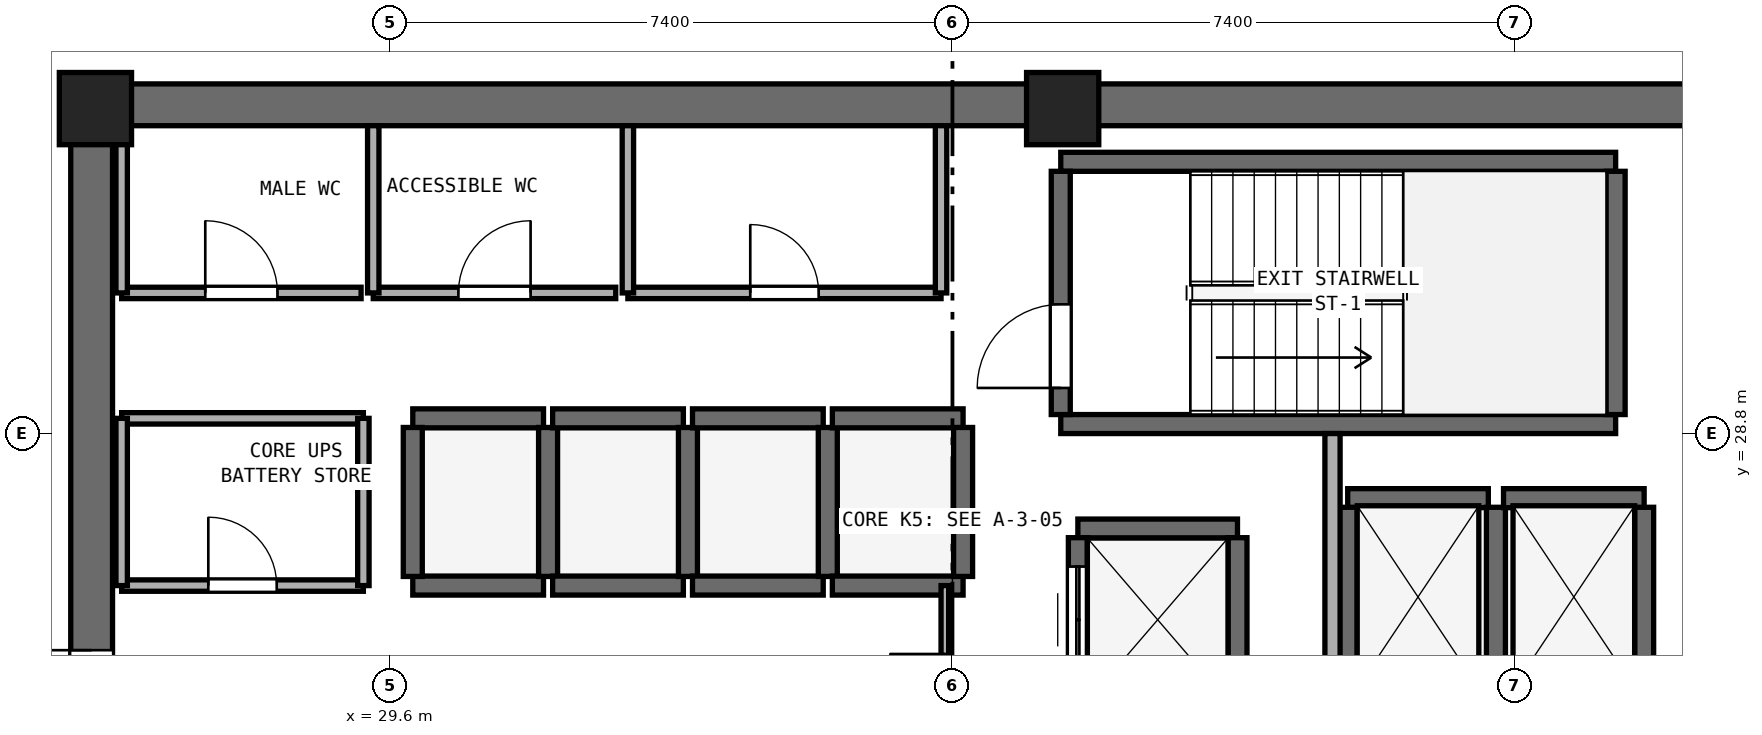
"""IFC4 building model, lengths in metres.
Left out: names, types, materials, properties, quantities, classifications, styles, units other than length and angle.
Written with IfcOpenShell. Run it as: python <this file> out.ifc"""

import sys

from ifc_helpers import new_model, si_unit, direction, frame, frame_2d, origin, origin_2d, place, context, subcontext, project, spatial, rectangle, extrude, element, fill, save


model = new_model("IFC4")
c1 = context("Model", 3, precision=1e-05, world=origin(), true_north=direction((0.0, 1.0)))
c2 = subcontext(c1, "Body", "Model", "MODEL_VIEW")
j1 = project(units=[si_unit("LENGTHUNIT", "METRE"), si_unit("PLANEANGLEUNIT", "RADIAN")], contexts=[c1])
p1 = place(None, origin())
s1 = spatial("IfcSite", under=j1, at=p1, CompositionType="ELEMENT")
p2 = place(p1, origin())
s2 = spatial("IfcBuilding", under=s1, at=p2, CompositionType="ELEMENT")
p3 = place(p2, frame((0.0, 0.0, 204.8)))
s3 = spatial("IfcBuildingStorey", under=s2, at=p3, CompositionType="ELEMENT", Elevation=204.8)
p4 = place(p3, frame((25.4, 33.125, 0.0), z_axis=(0.0, 0.0, 1.0), x_axis=(1.0, 0.0, 0.0)))
e1 = element("IfcWall", 1, at=p4, inside=s3, PredefinedType="SHEAR", context=c2, shape_type="SweptSolid", body=[
    extrude(rectangle(XDim=23.2, YDim=0.55, at=frame_2d((11.6, 0.0))), origin(), (0.0, 0.0, 1.0), 3.54),
])
p5 = place(p3, frame((25.675, 17.55, 0.0), z_axis=(0.0, 0.0, 1.0), x_axis=(0.0, 1.0, 0.0)))
e2 = element("IfcWall", 2, at=p5, inside=s3, PredefinedType="SHEAR", context=c2, shape_type="SweptSolid", body=[
    extrude(rectangle(XDim=15.3, YDim=0.55, at=frame_2d((7.65, 0.0))), origin(), (0.0, 0.0, 1.0), 3.54),
])
p6 = place(p5, frame((6.9, 0.0, 0.0)))
e3 = element("IfcOpeningElement", 3, at=p6, cuts=e2, PredefinedType="OPENING", context=c2, shape_type="SweptSolid", body=[
    extrude(rectangle(XDim=1.5, YDim=2.15, at=frame_2d((0.75, 1.075))), frame((0.0, 0.285, 0.0), z_axis=(0.0, -1.0, 0.0), x_axis=(1.0, 0.0, 0.0)), (0.0, 0.0, 1.0), 0.57),
])
for number, where, z_axis, x_axis in (
    (4, (38.45, 33.075, 0.0), (0.0, 0.0, 1.0), (1.0, 0.0, 0.0)),
    (5, (25.725, 33.075, 0.0), (0.0, 0.0, 1.0), (1.0, 0.0, 0.0)),
):
    element("IfcColumn", number, at=place(p3, frame(where, z_axis=z_axis, x_axis=x_axis)), inside=s3, PredefinedType="PILASTER", context=c2, shape_type="SweptSolid", body=[
        extrude(rectangle(XDim=0.95, YDim=0.95, at=origin_2d()), origin(), (0.0, 0.0, 1.0), 3.8),
    ])
for number, where, z_axis, x_axis in (
    (6, (38.425, 28.925, 0.0), (0.0, 0.0, 1.0), (1.0, 0.0, 0.0)),
    (7, (38.425, 32.375, 0.0), (0.0, 0.0, 1.0), (1.0, 0.0, 0.0)),
):
    element("IfcWall", number, at=place(p3, frame(where, z_axis=z_axis, x_axis=x_axis)), inside=s3, PredefinedType="SHEAR", context=c2, shape_type="SweptSolid", body=[
        extrude(rectangle(XDim=7.3, YDim=0.25, at=frame_2d((3.65, 0.0))), origin(), (0.0, 0.0, 1.0), 3.54),
    ])
p7 = place(p3, frame((38.425, 29.05, 0.0), z_axis=(0.0, 0.0, 1.0), x_axis=(0.0, 1.0, 0.0)))
e8 = element("IfcWall", 8, at=p7, inside=s3, PredefinedType="SHEAR", context=c2, shape_type="SweptSolid", body=[
    extrude(rectangle(XDim=3.2, YDim=0.25, at=frame_2d((1.6, 0.0))), origin(), (0.0, 0.0, 1.0), 3.54),
])
p8 = place(p7, frame((0.35, 0.0, 0.0)))
e9 = element("IfcOpeningElement", 9, at=p8, cuts=e8, PredefinedType="OPENING", context=c2, shape_type="SweptSolid", body=[
    extrude(rectangle(XDim=1.1, YDim=2.15, at=frame_2d((0.55, 1.075))), frame((0.0, 0.135, 0.0), z_axis=(0.0, -1.0, 0.0), x_axis=(1.0, 0.0, 0.0)), (0.0, 0.0, 1.0), 0.27),
])
p9 = place(p3, frame((45.725, 29.05, 0.0), z_axis=(0.0, 0.0, 1.0), x_axis=(0.0, 1.0, 0.0)))
e10 = element("IfcWall", 10, at=p9, inside=s3, PredefinedType="SHEAR", context=c2, shape_type="SweptSolid", body=[
    extrude(rectangle(XDim=3.2, YDim=0.25, at=frame_2d((1.6, 0.0))), origin(), (0.0, 0.0, 1.0), 3.54),
])
for number, where, z_axis, x_axis in (
    (11, (29.9, 26.8, 0.0), (0.0, 0.0, 1.0), (1.0, 0.0, 0.0)),
    (12, (29.9, 29.0, 0.0), (0.0, 0.0, 1.0), (1.0, 0.0, 0.0)),
):
    element("IfcWall", number, at=place(p3, frame(where, z_axis=z_axis, x_axis=x_axis)), inside=s3, PredefinedType="SHEAR", context=c2, shape_type="SweptSolid", body=[
        extrude(rectangle(XDim=1.72, YDim=0.25, at=frame_2d((0.86, 0.0))), origin(), (0.0, 0.0, 1.0), 3.54),
    ])
for number, where, z_axis, x_axis in (
    (13, (29.9, 26.92, 0.0), (0.0, 0.0, 1.0), (0.0, 1.0, 0.0)),
    (14, (31.68, 26.92, 0.0), (0.0, 0.0, 1.0), (0.0, 1.0, 0.0)),
):
    element("IfcWall", number, at=place(p3, frame(where, z_axis=z_axis, x_axis=x_axis)), inside=s3, PredefinedType="SHEAR", context=c2, shape_type="SweptSolid", body=[
        extrude(rectangle(XDim=1.96, YDim=0.25, at=frame_2d((0.98, 0.0))), origin(), (0.0, 0.0, 1.0), 3.54),
    ])
for number, where, z_axis, x_axis in (
    (15, (31.74, 26.8, 0.0), (0.0, 0.0, 1.0), (1.0, 0.0, 0.0)),
    (16, (31.74, 29.0, 0.0), (0.0, 0.0, 1.0), (1.0, 0.0, 0.0)),
):
    element("IfcWall", number, at=place(p3, frame(where, z_axis=z_axis, x_axis=x_axis)), inside=s3, PredefinedType="SHEAR", context=c2, shape_type="SweptSolid", body=[
        extrude(rectangle(XDim=1.72, YDim=0.25, at=frame_2d((0.86, 0.0))), origin(), (0.0, 0.0, 1.0), 3.54),
    ])
p10 = place(p3, frame((33.52, 26.92, 0.0), z_axis=(0.0, 0.0, 1.0), x_axis=(0.0, 1.0, 0.0)))
e17 = element("IfcWall", 17, at=p10, inside=s3, PredefinedType="SHEAR", context=c2, shape_type="SweptSolid", body=[
    extrude(rectangle(XDim=1.96, YDim=0.25, at=frame_2d((0.98, 0.0))), origin(), (0.0, 0.0, 1.0), 3.54),
])
for number, where, z_axis, x_axis in (
    (18, (33.58, 26.8, 0.0), (0.0, 0.0, 1.0), (1.0, 0.0, 0.0)),
    (19, (33.58, 29.0, 0.0), (0.0, 0.0, 1.0), (1.0, 0.0, 0.0)),
):
    element("IfcWall", number, at=place(p3, frame(where, z_axis=z_axis, x_axis=x_axis)), inside=s3, PredefinedType="SHEAR", context=c2, shape_type="SweptSolid", body=[
        extrude(rectangle(XDim=1.72, YDim=0.25, at=frame_2d((0.86, 0.0))), origin(), (0.0, 0.0, 1.0), 3.54),
    ])
p11 = place(p3, frame((35.36, 26.92, 0.0), z_axis=(0.0, 0.0, 1.0), x_axis=(0.0, 1.0, 0.0)))
e20 = element("IfcWall", 20, at=p11, inside=s3, PredefinedType="SHEAR", context=c2, shape_type="SweptSolid", body=[
    extrude(rectangle(XDim=1.96, YDim=0.25, at=frame_2d((0.98, 0.0))), origin(), (0.0, 0.0, 1.0), 3.54),
])
for number, where, z_axis, x_axis in (
    (21, (35.42, 26.8, 0.0), (0.0, 0.0, 1.0), (1.0, 0.0, 0.0)),
    (22, (35.42, 29.0, 0.0), (0.0, 0.0, 1.0), (1.0, 0.0, 0.0)),
):
    element("IfcWall", number, at=place(p3, frame(where, z_axis=z_axis, x_axis=x_axis)), inside=s3, PredefinedType="SHEAR", context=c2, shape_type="SweptSolid", body=[
        extrude(rectangle(XDim=1.72, YDim=0.25, at=frame_2d((0.86, 0.0))), origin(), (0.0, 0.0, 1.0), 3.54),
    ])
p12 = place(p3, frame((37.14, 26.92, 0.0), z_axis=(0.0, 0.0, 1.0), x_axis=(0.0, 1.0, 0.0)))
e23 = element("IfcWall", 23, at=p12, inside=s3, PredefinedType="SHEAR", context=c2, shape_type="SweptSolid", body=[
    extrude(rectangle(XDim=1.96, YDim=0.25, at=frame_2d((0.98, 0.0))), origin(), (0.0, 0.0, 1.0), 3.54),
])
p13 = place(p3, frame((42.2, 27.95, 0.0), z_axis=(0.0, 0.0, 1.0), x_axis=(1.0, 0.0, 0.0)))
e24 = element("IfcWall", 24, at=p13, inside=s3, PredefinedType="SHEAR", context=c2, shape_type="SweptSolid", body=[
    extrude(rectangle(XDim=1.85, YDim=0.25, at=frame_2d((0.925, 0.0))), origin(), (0.0, 0.0, 1.0), 3.54),
])
for number, where, z_axis, x_axis in (
    (25, (42.2, 25.47, 0.0), (0.0, 0.0, 1.0), (0.0, 1.0, 0.0)),
    (26, (44.15, 25.47, 0.0), (0.0, 0.0, 1.0), (0.0, 1.0, 0.0)),
):
    element("IfcWall", number, at=place(p3, frame(where, z_axis=z_axis, x_axis=x_axis)), inside=s3, PredefinedType="SHEAR", context=c2, shape_type="SweptSolid", body=[
        extrude(rectangle(XDim=2.36, YDim=0.25, at=frame_2d((1.18, 0.0))), origin(), (0.0, 0.0, 1.0), 3.54),
    ])
p14 = place(p3, frame((44.25, 27.95, 0.0), z_axis=(0.0, 0.0, 1.0), x_axis=(1.0, 0.0, 0.0)))
e27 = element("IfcWall", 27, at=p14, inside=s3, PredefinedType="SHEAR", context=c2, shape_type="SweptSolid", body=[
    extrude(rectangle(XDim=1.85, YDim=0.25, at=frame_2d((0.925, 0.0))), origin(), (0.0, 0.0, 1.0), 3.54),
])
p15 = place(p3, frame((46.1, 25.47, 0.0), z_axis=(0.0, 0.0, 1.0), x_axis=(0.0, 1.0, 0.0)))
e28 = element("IfcWall", 28, at=p15, inside=s3, PredefinedType="SHEAR", context=c2, shape_type="SweptSolid", body=[
    extrude(rectangle(XDim=2.36, YDim=0.25, at=frame_2d((1.18, 0.0))), origin(), (0.0, 0.0, 1.0), 3.54),
])
p16 = place(p3, frame((38.65, 27.55, 0.0), z_axis=(0.0, 0.0, 1.0), x_axis=(1.0, 0.0, 0.0)))
e29 = element("IfcWall", 29, at=p16, inside=s3, PredefinedType="SHEAR", context=c2, shape_type="SweptSolid", body=[
    extrude(rectangle(XDim=2.1, YDim=0.25, at=frame_2d((1.05, 0.0))), origin(), (0.0, 0.0, 1.0), 3.54),
])
p17 = place(p3, frame((38.65, 25.27, 0.0), z_axis=(0.0, 0.0, 1.0), x_axis=(0.0, 1.0, 0.0)))
e30 = element("IfcWall", 30, at=p17, inside=s3, PredefinedType="SHEAR", context=c2, shape_type="SweptSolid", body=[
    extrude(rectangle(XDim=2.16, YDim=0.25, at=frame_2d((1.08, 0.0))), origin(), (0.0, 0.0, 1.0), 3.54),
])
p18 = place(p17, frame((0.38, 0.0, 0.0)))
e31 = element("IfcOpeningElement", 31, at=p18, cuts=e30, PredefinedType="OPENING", context=c2, shape_type="SweptSolid", body=[
    extrude(rectangle(XDim=1.4, YDim=2.2, at=frame_2d((0.7, 1.1))), frame((0.0, 0.135, 0.0), z_axis=(0.0, -1.0, 0.0), x_axis=(1.0, 0.0, 0.0)), (0.0, 0.0, 1.0), 0.27),
])
p19 = place(p3, frame((40.75, 25.27, 0.0), z_axis=(0.0, 0.0, 1.0), x_axis=(0.0, 1.0, 0.0)))
e32 = element("IfcWall", 32, at=p19, inside=s3, PredefinedType="SHEAR", context=c2, shape_type="SweptSolid", body=[
    extrude(rectangle(XDim=2.16, YDim=0.25, at=frame_2d((1.08, 0.0))), origin(), (0.0, 0.0, 1.0), 3.54),
])
p20 = place(p3, frame((42.0, 22.75, 0.0), z_axis=(0.0, 0.0, 1.0), x_axis=(0.0, 1.0, 0.0)))
e33 = element("IfcWall", 33, at=p20, inside=s3, PredefinedType="SOLIDWALL", context=c2, shape_type="SweptSolid", body=[
    extrude(rectangle(XDim=6.05, YDim=0.2, at=frame_2d((3.025, 0.0))), origin(), (0.0, 0.0, 1.0), 3.54),
])
p21 = place(p20, frame((0.65, 0.0, 0.0)))
e34 = element("IfcOpeningElement", 34, at=p21, cuts=e33, PredefinedType="OPENING", context=c2, shape_type="SweptSolid", body=[
    extrude(rectangle(XDim=1.2, YDim=2.15, at=frame_2d((0.6, 1.075))), frame((0.0, 0.11, 0.0), z_axis=(0.0, -1.0, 0.0), x_axis=(1.0, 0.0, 0.0)), (0.0, 0.0, 1.0), 0.22),
])
p22 = place(p3, frame((26.07, 30.65, 0.0), z_axis=(0.0, 0.0, 1.0), x_axis=(1.0, 0.0, 0.0)))
e35 = element("IfcWall", 35, at=p22, inside=s3, PredefinedType="PARTITIONING", context=c2, shape_type="SweptSolid", body=[
    extrude(rectangle(XDim=3.15, YDim=0.15, at=frame_2d((1.575, 0.0))), origin(), (0.0, 0.0, 1.0), 3.54),
])
p23 = place(p22, frame((1.1, 0.0, 0.0)))
e36 = element("IfcOpeningElement", 36, at=p23, cuts=e35, PredefinedType="OPENING", context=c2, shape_type="SweptSolid", body=[
    extrude(rectangle(XDim=0.95, YDim=2.1, at=frame_2d((0.475, 1.05))), frame((0.0, 0.085, 0.0), z_axis=(0.0, -1.0, 0.0), x_axis=(1.0, 0.0, 0.0)), (0.0, 0.0, 1.0), 0.17),
])
p24 = place(p3, frame((26.07, 30.65, 0.0), z_axis=(0.0, 0.0, 1.0), x_axis=(0.0, 1.0, 0.0)))
e37 = element("IfcWall", 37, at=p24, inside=s3, PredefinedType="PARTITIONING", context=c2, shape_type="SweptSolid", body=[
    extrude(rectangle(XDim=2.2, YDim=0.15, at=frame_2d((1.1, 0.0))), origin(), (0.0, 0.0, 1.0), 2.64),
])
p25 = place(p3, frame((29.38, 30.65, 0.0), z_axis=(0.0, 0.0, 1.0), x_axis=(1.0, 0.0, 0.0)))
e38 = element("IfcWall", 38, at=p25, inside=s3, PredefinedType="PARTITIONING", context=c2, shape_type="SweptSolid", body=[
    extrude(rectangle(XDim=3.19, YDim=0.15, at=frame_2d((1.595, 0.0))), origin(), (0.0, 0.0, 1.0), 3.54),
])
p26 = place(p25, frame((1.12, 0.0, 0.0)))
e39 = element("IfcOpeningElement", 39, at=p26, cuts=e38, PredefinedType="OPENING", context=c2, shape_type="SweptSolid", body=[
    extrude(rectangle(XDim=0.95, YDim=2.1, at=frame_2d((0.475, 1.05))), frame((0.0, 0.085, 0.0), z_axis=(0.0, -1.0, 0.0), x_axis=(1.0, 0.0, 0.0)), (0.0, 0.0, 1.0), 0.17),
])
p27 = place(p3, frame((29.38, 30.65, 0.0), z_axis=(0.0, 0.0, 1.0), x_axis=(0.0, 1.0, 0.0)))
e40 = element("IfcWall", 40, at=p27, inside=s3, PredefinedType="PARTITIONING", context=c2, shape_type="SweptSolid", body=[
    extrude(rectangle(XDim=2.2, YDim=0.15, at=frame_2d((1.1, 0.0))), origin(), (0.0, 0.0, 1.0), 3.54),
])
p28 = place(p3, frame((32.73, 30.65, 0.0), z_axis=(0.0, 0.0, 1.0), x_axis=(1.0, 0.0, 0.0)))
e41 = element("IfcWall", 41, at=p28, inside=s3, PredefinedType="PARTITIONING", context=c2, shape_type="SweptSolid", body=[
    extrude(rectangle(XDim=4.12, YDim=0.15, at=frame_2d((2.06, 0.0))), origin(), (0.0, 0.0, 1.0), 3.54),
])
p29 = place(p28, frame((1.61, 0.0, 0.0)))
e42 = element("IfcOpeningElement", 42, at=p29, cuts=e41, PredefinedType="OPENING", context=c2, shape_type="SweptSolid", body=[
    extrude(rectangle(XDim=0.9, YDim=2.1, at=frame_2d((0.45, 1.05))), frame((0.0, 0.085, 0.0), z_axis=(0.0, -1.0, 0.0), x_axis=(1.0, 0.0, 0.0)), (0.0, 0.0, 1.0), 0.17),
])
for number, where, z_axis, x_axis in (
    (43, (32.73, 30.65, 0.0), (0.0, 0.0, 1.0), (0.0, 1.0, 0.0)),
    (44, (36.85, 30.65, 0.0), (0.0, 0.0, 1.0), (0.0, 1.0, 0.0)),
):
    element("IfcWall", number, at=place(p3, frame(where, z_axis=z_axis, x_axis=x_axis)), inside=s3, PredefinedType="PARTITIONING", context=c2, shape_type="SweptSolid", body=[
        extrude(rectangle(XDim=2.2, YDim=0.15, at=frame_2d((1.1, 0.0))), origin(), (0.0, 0.0, 1.0), 3.54),
    ])
p30 = place(p3, frame((26.07, 26.8, 0.0), z_axis=(0.0, 0.0, 1.0), x_axis=(1.0, 0.0, 0.0)))
e45 = element("IfcWall", 45, at=p30, inside=s3, PredefinedType="PARTITIONING", context=c2, shape_type="SweptSolid", body=[
    extrude(rectangle(XDim=3.18, YDim=0.15, at=frame_2d((1.59, 0.0))), origin(), (0.0, 0.0, 1.0), 3.54),
])
p31 = place(p30, frame((1.14, 0.0, 0.0)))
e46 = element("IfcOpeningElement", 46, at=p31, cuts=e45, PredefinedType="OPENING", context=c2, shape_type="SweptSolid", body=[
    extrude(rectangle(XDim=0.9, YDim=2.1, at=frame_2d((0.45, 1.05))), frame((0.0, 0.085, 0.0), z_axis=(0.0, -1.0, 0.0), x_axis=(1.0, 0.0, 0.0)), (0.0, 0.0, 1.0), 0.17),
])
p32 = place(p3, frame((26.07, 29.0, 0.0), z_axis=(0.0, 0.0, 1.0), x_axis=(1.0, 0.0, 0.0)))
e47 = element("IfcWall", 47, at=p32, inside=s3, PredefinedType="PARTITIONING", context=c2, shape_type="SweptSolid", body=[
    extrude(rectangle(XDim=3.18, YDim=0.15, at=frame_2d((1.59, 0.0))), origin(), (0.0, 0.0, 1.0), 3.54),
])
p33 = place(p3, frame((26.07, 26.8, 0.0), z_axis=(0.0, 0.0, 1.0), x_axis=(0.0, 1.0, 0.0)))
e48 = element("IfcWall", 48, at=p33, inside=s3, PredefinedType="PARTITIONING", context=c2, shape_type="SweptSolid", body=[
    extrude(rectangle(XDim=2.2, YDim=0.15, at=frame_2d((1.1, 0.0))), origin(), (0.0, 0.0, 1.0), 2.64),
])
p34 = place(p3, frame((29.25, 26.8, 0.0), z_axis=(0.0, 0.0, 1.0), x_axis=(0.0, 1.0, 0.0)))
e49 = element("IfcWall", 49, at=p34, inside=s3, PredefinedType="PARTITIONING", context=c2, shape_type="SweptSolid", body=[
    extrude(rectangle(XDim=2.2, YDim=0.15, at=frame_2d((1.1, 0.0))), origin(), (0.0, 0.0, 1.0), 3.54),
])
p35 = place(p3, frame((36.9, 23.6, 0.0), z_axis=(0.0, 0.0, 1.0), x_axis=(0.0, 1.0, 0.0)))
e50 = element("IfcWall", 50, at=p35, inside=s3, PredefinedType="PARTITIONING", context=c2, shape_type="SweptSolid", body=[
    extrude(rectangle(XDim=3.2, YDim=0.1, at=frame_2d((1.6, 0.0))), origin(), (0.0, 0.0, 1.0), 3.54),
])
p36 = place(p35, frame((0.85, 0.0, 0.0)))
e51 = element("IfcOpeningElement", 51, at=p36, cuts=e50, PredefinedType="OPENING", context=c2, shape_type="SweptSolid", body=[
    extrude(rectangle(XDim=1.45, YDim=2.12, at=frame_2d((0.725, 1.06))), frame((0.0, 0.06, 0.0), z_axis=(0.0, -1.0, 0.0), x_axis=(1.0, 0.0, 0.0)), (0.0, 0.0, 1.0), 0.12),
])
p37 = place(p8, origin())
e52 = element("IfcDoor", 52, at=p37, inside=s3, OperationType="SINGLE_SWING_LEFT", PredefinedType="DOOR", context=c2, shape_type="SweptSolid", body=[
    extrude(rectangle(XDim=1.1, YDim=2.15, at=frame_2d((0.55, 1.075))), frame((0.0, 0.025, 0.0), z_axis=(0.0, -1.0, 0.0), x_axis=(1.0, 0.0, 0.0)), (0.0, 0.0, 1.0), 0.05),
])
fill(e9, e52)
p38 = place(p18, origin())
e53 = element("IfcDoor", 53, at=p38, inside=s3, OperationType="DOUBLE_DOOR_SLIDING", PredefinedType="DOOR", context=c2, shape_type="SweptSolid", body=[
    extrude(rectangle(XDim=1.4, YDim=2.2, at=frame_2d((0.7, 1.1))), frame((0.0, 0.025, 0.0), z_axis=(0.0, -1.0, 0.0), x_axis=(1.0, 0.0, 0.0)), (0.0, 0.0, 1.0), 0.05),
])
fill(e31, e53)
p39 = place(p6, origin())
e54 = element("IfcDoor", 54, at=p39, inside=s3, OperationType="DOUBLE_DOOR_SINGLE_SWING", PredefinedType="DOOR", context=c2, shape_type="SweptSolid", body=[
    extrude(rectangle(XDim=1.5, YDim=2.15, at=frame_2d((0.75, 1.075))), frame((0.0, 0.025, 0.0), z_axis=(0.0, -1.0, 0.0), x_axis=(1.0, 0.0, 0.0)), (0.0, 0.0, 1.0), 0.05),
])
fill(e3, e54)
p40 = place(p23, origin())
e55 = element("IfcDoor", 55, at=p40, inside=s3, OperationType="SINGLE_SWING_LEFT", PredefinedType="DOOR", context=c2, shape_type="SweptSolid", body=[
    extrude(rectangle(XDim=0.95, YDim=2.1, at=frame_2d((0.475, 1.05))), frame((0.0, 0.025, 0.0), z_axis=(0.0, -1.0, 0.0), x_axis=(1.0, 0.0, 0.0)), (0.0, 0.0, 1.0), 0.05),
])
fill(e36, e55)
p41 = place(p26, origin())
e56 = element("IfcDoor", 56, at=p41, inside=s3, OperationType="SINGLE_SWING_RIGHT", PredefinedType="DOOR", context=c2, shape_type="SweptSolid", body=[
    extrude(rectangle(XDim=0.95, YDim=2.1, at=frame_2d((0.475, 1.05))), frame((0.0, 0.025, 0.0), z_axis=(0.0, -1.0, 0.0), x_axis=(1.0, 0.0, 0.0)), (0.0, 0.0, 1.0), 0.05),
])
fill(e39, e56)
p42 = place(p29, origin())
e57 = element("IfcDoor", 57, at=p42, inside=s3, OperationType="SINGLE_SWING_LEFT", PredefinedType="DOOR", context=c2, shape_type="SweptSolid", body=[
    extrude(rectangle(XDim=0.9, YDim=2.1, at=frame_2d((0.45, 1.05))), frame((0.0, 0.025, 0.0), z_axis=(0.0, -1.0, 0.0), x_axis=(1.0, 0.0, 0.0)), (0.0, 0.0, 1.0), 0.05),
])
fill(e42, e57)
p43 = place(p31, origin())
e58 = element("IfcDoor", 58, at=p43, inside=s3, OperationType="SINGLE_SWING_LEFT", PredefinedType="DOOR", context=c2, shape_type="SweptSolid", body=[
    extrude(rectangle(XDim=0.9, YDim=2.1, at=frame_2d((0.45, 1.05))), frame((0.0, 0.025, 0.0), z_axis=(0.0, -1.0, 0.0), x_axis=(1.0, 0.0, 0.0)), (0.0, 0.0, 1.0), 0.05),
])
fill(e46, e58)
p44 = place(p36, origin())
e59 = element("IfcDoor", 59, at=p44, inside=s3, OperationType="DOUBLE_DOOR_SINGLE_SWING", PredefinedType="DOOR", context=c2, shape_type="SweptSolid", body=[
    extrude(rectangle(XDim=1.45, YDim=2.12, at=frame_2d((0.725, 1.06))), frame((0.0, 0.025, 0.0), z_axis=(0.0, -1.0, 0.0), x_axis=(1.0, 0.0, 0.0)), (0.0, 0.0, 1.0), 0.05),
])
fill(e51, e59)
save(model, sys.argv[1])
